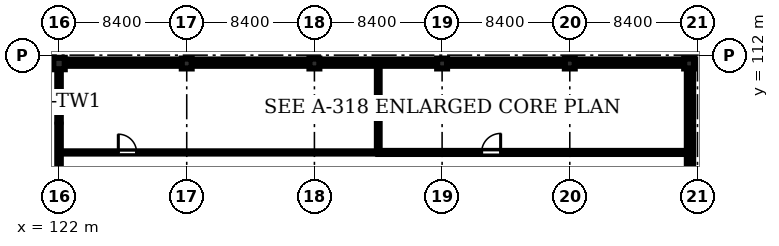
"""IFC4 building model, lengths in metres.
Left out: names, types, materials, properties, quantities, classifications, styles, units other than length and angle.
Written with IfcOpenShell. Run it as: python <this file> out.ifc"""

import sys

from ifc_helpers import new_model, si_unit, direction, frame, frame_2d, origin, origin_2d, place, context, subcontext, project, spatial, rectangle, extrude, element, fill, save


model = new_model("IFC4")
c1 = context("Model", 3, precision=1e-05, world=origin(), true_north=direction((0.0, 1.0)))
c2 = subcontext(c1, "Body", "Model", "MODEL_VIEW")
j1 = project(units=[si_unit("LENGTHUNIT", "METRE"), si_unit("PLANEANGLEUNIT", "RADIAN")], contexts=[c1])
p1 = place(None, origin())
s1 = spatial("IfcSite", under=j1, at=p1, CompositionType="ELEMENT")
p2 = place(p1, origin())
s2 = spatial("IfcBuilding", under=s1, at=p2, CompositionType="ELEMENT")
p3 = place(p2, frame((0.0, 0.0, 65.7)))
s3 = spatial("IfcBuildingStorey", under=s2, at=p3, CompositionType="ELEMENT", Elevation=65.7)
p4 = place(p3, frame((122.0, 111.45, 0.0), z_axis=(0.0, 0.0, 1.0), x_axis=(1.0, 0.0, 0.0)))
e1 = element("IfcColumn", 1, at=p4, inside=s3, PredefinedType="COLUMN", context=c2, shape_type="SweptSolid", body=[
    extrude(rectangle(XDim=0.75, YDim=0.75, at=origin_2d()), origin(), (0.0, 0.0, 1.0), 4.3),
])
for number, where, z_axis, x_axis in (
    (2, (130.4, 111.45, 0.0), (0.0, 0.0, 1.0), (1.0, 0.0, 0.0)),
    (3, (138.8, 111.45, 0.0), (0.0, 0.0, 1.0), (1.0, 0.0, 0.0)),
    (4, (147.2, 111.45, 0.0), (0.0, 0.0, 1.0), (1.0, 0.0, 0.0)),
    (5, (155.6, 111.45, 0.0), (0.0, 0.0, 1.0), (1.0, 0.0, 0.0)),
    (6, (163.45, 111.45, 0.0), (0.0, 0.0, 1.0), (1.0, 0.0, 0.0)),
):
    element("IfcColumn", number, at=place(p3, frame(where, z_axis=z_axis, x_axis=x_axis)), inside=s3, PredefinedType="COLUMN", context=c2, shape_type="SweptSolid", body=[
        extrude(rectangle(XDim=0.65, YDim=0.65, at=origin_2d()), origin(), (0.0, 0.0, 1.0), 4.3),
    ])
p5 = place(p3, frame((122.375, 111.45, 0.0), z_axis=(0.0, 0.0, 1.0), x_axis=(1.0, 0.0, 0.0)))
e7 = element("IfcWall", 7, at=p5, inside=s3, PredefinedType="STANDARD", context=c2, shape_type="SweptSolid", body=[
    extrude(rectangle(XDim=7.7, YDim=0.3, at=frame_2d((3.85, 0.0))), origin(), (0.0, 0.0, 1.0), 3.7),
])
p6 = place(p5, frame((2.4, 0.0, 1.3)))
e8 = element("IfcOpeningElement", 8, at=p6, cuts=e7, PredefinedType="OPENING", context=c2, shape_type="SweptSolid", body=[
    extrude(rectangle(XDim=2.2, YDim=1.2, at=frame_2d((1.1, 0.6))), frame((0.0, 0.16, 0.0), z_axis=(0.0, -1.0, 0.0), x_axis=(1.0, 0.0, 0.0)), (0.0, 0.0, 1.0), 0.32),
])
p7 = place(p3, frame((130.725, 111.45, 0.0), z_axis=(0.0, 0.0, 1.0), x_axis=(1.0, 0.0, 0.0)))
e9 = element("IfcWall", 9, at=p7, inside=s3, PredefinedType="STANDARD", context=c2, shape_type="SweptSolid", body=[
    extrude(rectangle(XDim=7.75, YDim=0.3, at=frame_2d((3.875, 0.0))), origin(), (0.0, 0.0, 1.0), 3.7),
])
p8 = place(p7, frame((2.4, 0.0, 1.3)))
e10 = element("IfcOpeningElement", 10, at=p8, cuts=e9, PredefinedType="OPENING", context=c2, shape_type="SweptSolid", body=[
    extrude(rectangle(XDim=2.2, YDim=1.2, at=frame_2d((1.1, 0.6))), frame((0.0, 0.16, 0.0), z_axis=(0.0, -1.0, 0.0), x_axis=(1.0, 0.0, 0.0)), (0.0, 0.0, 1.0), 0.32),
])
p9 = place(p3, frame((139.125, 111.45, 0.0), z_axis=(0.0, 0.0, 1.0), x_axis=(1.0, 0.0, 0.0)))
e11 = element("IfcWall", 11, at=p9, inside=s3, PredefinedType="STANDARD", context=c2, shape_type="SweptSolid", body=[
    extrude(rectangle(XDim=7.75, YDim=0.3, at=frame_2d((3.875, 0.0))), origin(), (0.0, 0.0, 1.0), 3.7),
])
p10 = place(p9, frame((4.4, 0.0, 1.3)))
e12 = element("IfcOpeningElement", 12, at=p10, cuts=e11, PredefinedType="OPENING", context=c2, shape_type="SweptSolid", body=[
    extrude(rectangle(XDim=2.2, YDim=1.2, at=frame_2d((1.1, 0.6))), frame((0.0, 0.16, 0.0), z_axis=(0.0, -1.0, 0.0), x_axis=(1.0, 0.0, 0.0)), (0.0, 0.0, 1.0), 0.32),
])
p11 = place(p3, frame((147.525, 111.45, 0.0), z_axis=(0.0, 0.0, 1.0), x_axis=(1.0, 0.0, 0.0)))
e13 = element("IfcWall", 13, at=p11, inside=s3, PredefinedType="STANDARD", context=c2, shape_type="SweptSolid", body=[
    extrude(rectangle(XDim=7.75, YDim=0.3, at=frame_2d((3.875, 0.0))), origin(), (0.0, 0.0, 1.0), 3.7),
])
p12 = place(p11, frame((2.4, 0.0, 1.3)))
e14 = element("IfcOpeningElement", 14, at=p12, cuts=e13, PredefinedType="OPENING", context=c2, shape_type="SweptSolid", body=[
    extrude(rectangle(XDim=2.2, YDim=1.2, at=frame_2d((1.1, 0.6))), frame((0.0, 0.16, 0.0), z_axis=(0.0, -1.0, 0.0), x_axis=(1.0, 0.0, 0.0)), (0.0, 0.0, 1.0), 0.32),
])
p13 = place(p3, frame((155.925, 111.45, 0.0), z_axis=(0.0, 0.0, 1.0), x_axis=(1.0, 0.0, 0.0)))
e15 = element("IfcWall", 15, at=p13, inside=s3, PredefinedType="STANDARD", context=c2, shape_type="SweptSolid", body=[
    extrude(rectangle(XDim=7.2, YDim=0.3, at=frame_2d((3.6, 0.0))), origin(), (0.0, 0.0, 1.0), 3.7),
])
p14 = place(p13, frame((2.4, 0.0, 1.3)))
e16 = element("IfcOpeningElement", 16, at=p14, cuts=e15, PredefinedType="OPENING", context=c2, shape_type="SweptSolid", body=[
    extrude(rectangle(XDim=2.2, YDim=1.2, at=frame_2d((1.1, 0.6))), frame((0.0, 0.16, 0.0), z_axis=(0.0, -1.0, 0.0), x_axis=(1.0, 0.0, 0.0)), (0.0, 0.0, 1.0), 0.32),
])
p15 = place(p3, frame((163.45, 111.125, 0.0), z_axis=(0.0, 0.0, 1.0), x_axis=(0.0, -1.0, 0.0)))
e17 = element("IfcWall", 17, at=p15, inside=s3, PredefinedType="STANDARD", context=c2, shape_type="SweptSolid", body=[
    extrude(rectangle(XDim=7.2, YDim=0.3, at=frame_2d((3.6, 0.0))), origin(), (0.0, 0.0, 1.0), 3.7),
])
p16 = place(p15, frame((1.15, 0.0, 1.1)))
e18 = element("IfcOpeningElement", 18, at=p16, cuts=e17, PredefinedType="OPENING", context=c2, shape_type="SweptSolid", body=[
    extrude(rectangle(XDim=1.8, YDim=1.8, at=frame_2d((0.9, 0.9))), frame((0.0, 0.16, 0.0), z_axis=(0.0, -1.0, 0.0), x_axis=(1.0, 0.0, 0.0)), (0.0, 0.0, 1.0), 0.32),
])
p17 = place(p3, frame((163.6, 78.515, 4.5), z_axis=(0.0, 0.0, 1.0), x_axis=(0.0, 1.0, 0.0)))
e19 = element("IfcWall", 19, at=p17, inside=s3, PredefinedType="PARAPET", context=c2, shape_type="SweptSolid", body=[
    extrude(rectangle(XDim=32.97, YDim=0.23, at=frame_2d((16.485, 0.0))), origin(), (0.0, 0.0, 1.0), 1.35),
])
p18 = place(p3, frame((163.715, 111.6, 4.5), z_axis=(0.0, 0.0, 1.0), x_axis=(-1.0, 0.0, 0.0)))
e20 = element("IfcWall", 20, at=p18, inside=s3, PredefinedType="PARAPET", context=c2, shape_type="SweptSolid", body=[
    extrude(rectangle(XDim=41.83, YDim=0.23, at=frame_2d((20.915, 0.0))), origin(), (0.0, 0.0, 1.0), 1.35),
])
p19 = place(p3, frame((122.0, 111.485, 4.5), z_axis=(0.0, 0.0, 1.0), x_axis=(0.0, -1.0, 0.0)))
e21 = element("IfcWall", 21, at=p19, inside=s3, PredefinedType="PARAPET", context=c2, shape_type="SweptSolid", body=[
    extrude(rectangle(XDim=7.77, YDim=0.23, at=frame_2d((3.885, 0.0))), origin(), (0.0, 0.0, 1.0), 1.35),
])
p20 = place(p3, frame((122.15, 105.6, 0.0), z_axis=(0.0, 0.0, 1.0), x_axis=(1.0, 0.0, 0.0)))
e22 = element("IfcWall", 22, at=p20, inside=s3, PredefinedType="PARTITIONING", context=c2, shape_type="SweptSolid", body=[
    extrude(rectangle(XDim=20.85, YDim=0.145, at=frame_2d((10.425, 0.0))), origin(), (0.0, 0.0, 1.0), 4.3),
])
p21 = place(p20, frame((3.75, 0.0, 0.0)))
e23 = element("IfcOpeningElement", 23, at=p21, cuts=e22, PredefinedType="OPENING", context=c2, shape_type="SweptSolid", body=[
    extrude(rectangle(XDim=1.2, YDim=2.2, at=frame_2d((0.6, 1.1))), frame((0.0, 0.083, 0.0), z_axis=(0.0, -1.0, 0.0), x_axis=(1.0, 0.0, 0.0)), (0.0, 0.0, 1.0), 0.165),
])
p22 = place(p3, frame((143.0, 105.6, 0.0), z_axis=(0.0, 0.0, 1.0), x_axis=(1.0, 0.0, 0.0)))
e24 = element("IfcWall", 24, at=p22, inside=s3, PredefinedType="SOLIDWALL", context=c2, shape_type="SweptSolid", body=[
    extrude(rectangle(XDim=20.35, YDim=0.2, at=frame_2d((10.175, 0.0))), origin(), (0.0, 0.0, 1.0), 4.3),
])
p23 = place(p22, frame((6.8, 0.0, 0.0)))
e25 = element("IfcOpeningElement", 25, at=p23, cuts=e24, PredefinedType="OPENING", context=c2, shape_type="SweptSolid", body=[
    extrude(rectangle(XDim=1.25, YDim=2.2, at=frame_2d((0.625, 1.1))), frame((0.0, 0.11, 0.0), z_axis=(0.0, -1.0, 0.0), x_axis=(1.0, 0.0, 0.0)), (0.0, 0.0, 1.0), 0.22),
])
p24 = place(p3, frame((143.0, 105.6, 0.0), z_axis=(0.0, 0.0, 1.0), x_axis=(0.0, 1.0, 0.0)))
e26 = element("IfcWall", 26, at=p24, inside=s3, PredefinedType="STANDARD", context=c2, shape_type="SweptSolid", body=[
    extrude(rectangle(XDim=5.75, YDim=0.18, at=frame_2d((2.875, 0.0))), origin(), (0.0, 0.0, 1.0), 3.85),
])
p25 = place(p6, origin())
e27 = element("IfcWindow", 27, at=p25, inside=s3, PartitioningType="DOUBLE_PANEL_HORIZONTAL", PredefinedType="WINDOW", context=c2, shape_type="SweptSolid", body=[
    extrude(rectangle(XDim=2.2, YDim=1.2, at=frame_2d((1.1, 0.6))), frame((0.0, 0.03, 0.0), z_axis=(0.0, -1.0, 0.0), x_axis=(1.0, 0.0, 0.0)), (0.0, 0.0, 1.0), 0.06),
])
fill(e8, e27)
p26 = place(p8, origin())
e28 = element("IfcWindow", 28, at=p26, inside=s3, PartitioningType="DOUBLE_PANEL_HORIZONTAL", PredefinedType="WINDOW", context=c2, shape_type="SweptSolid", body=[
    extrude(rectangle(XDim=2.2, YDim=1.2, at=frame_2d((1.1, 0.6))), frame((0.0, 0.03, 0.0), z_axis=(0.0, -1.0, 0.0), x_axis=(1.0, 0.0, 0.0)), (0.0, 0.0, 1.0), 0.06),
])
fill(e10, e28)
p27 = place(p10, origin())
e29 = element("IfcWindow", 29, at=p27, inside=s3, PartitioningType="DOUBLE_PANEL_HORIZONTAL", PredefinedType="WINDOW", context=c2, shape_type="SweptSolid", body=[
    extrude(rectangle(XDim=2.2, YDim=1.2, at=frame_2d((1.1, 0.6))), frame((0.0, 0.03, 0.0), z_axis=(0.0, -1.0, 0.0), x_axis=(1.0, 0.0, 0.0)), (0.0, 0.0, 1.0), 0.06),
])
fill(e12, e29)
p28 = place(p12, origin())
e30 = element("IfcWindow", 30, at=p28, inside=s3, PartitioningType="DOUBLE_PANEL_HORIZONTAL", PredefinedType="WINDOW", context=c2, shape_type="SweptSolid", body=[
    extrude(rectangle(XDim=2.2, YDim=1.2, at=frame_2d((1.1, 0.6))), frame((0.0, 0.03, 0.0), z_axis=(0.0, -1.0, 0.0), x_axis=(1.0, 0.0, 0.0)), (0.0, 0.0, 1.0), 0.06),
])
fill(e14, e30)
p29 = place(p14, origin())
e31 = element("IfcWindow", 31, at=p29, inside=s3, PartitioningType="DOUBLE_PANEL_HORIZONTAL", PredefinedType="WINDOW", context=c2, shape_type="SweptSolid", body=[
    extrude(rectangle(XDim=2.2, YDim=1.2, at=frame_2d((1.1, 0.6))), frame((0.0, 0.03, 0.0), z_axis=(0.0, -1.0, 0.0), x_axis=(1.0, 0.0, 0.0)), (0.0, 0.0, 1.0), 0.06),
])
fill(e16, e31)
p30 = place(p16, origin())
e32 = element("IfcWindow", 32, at=p30, inside=s3, PartitioningType="DOUBLE_PANEL_VERTICAL", PredefinedType="WINDOW", context=c2, shape_type="SweptSolid", body=[
    extrude(rectangle(XDim=1.8, YDim=1.8, at=frame_2d((0.9, 0.9))), frame((0.0, 0.03, 0.0), z_axis=(0.0, -1.0, 0.0), x_axis=(1.0, 0.0, 0.0)), (0.0, 0.0, 1.0), 0.06),
])
fill(e18, e32)
p31 = place(p21, origin())
e33 = element("IfcDoor", 33, at=p31, inside=s3, OperationType="SINGLE_SWING_LEFT", PredefinedType="DOOR", context=c2, shape_type="SweptSolid", body=[
    extrude(rectangle(XDim=1.2, YDim=2.2, at=frame_2d((0.6, 1.1))), frame((0.0, 0.025, 0.0), z_axis=(0.0, -1.0, 0.0), x_axis=(1.0, 0.0, 0.0)), (0.0, 0.0, 1.0), 0.05),
])
fill(e23, e33)
p32 = place(p23, origin())
e34 = element("IfcDoor", 34, at=p32, inside=s3, OperationType="SINGLE_SWING_RIGHT", PredefinedType="DOOR", context=c2, shape_type="SweptSolid", body=[
    extrude(rectangle(XDim=1.25, YDim=2.2, at=frame_2d((0.625, 1.1))), frame((0.0, 0.025, 0.0), z_axis=(0.0, -1.0, 0.0), x_axis=(1.0, 0.0, 0.0)), (0.0, 0.0, 1.0), 0.05),
])
fill(e25, e34)
save(model, sys.argv[1])
